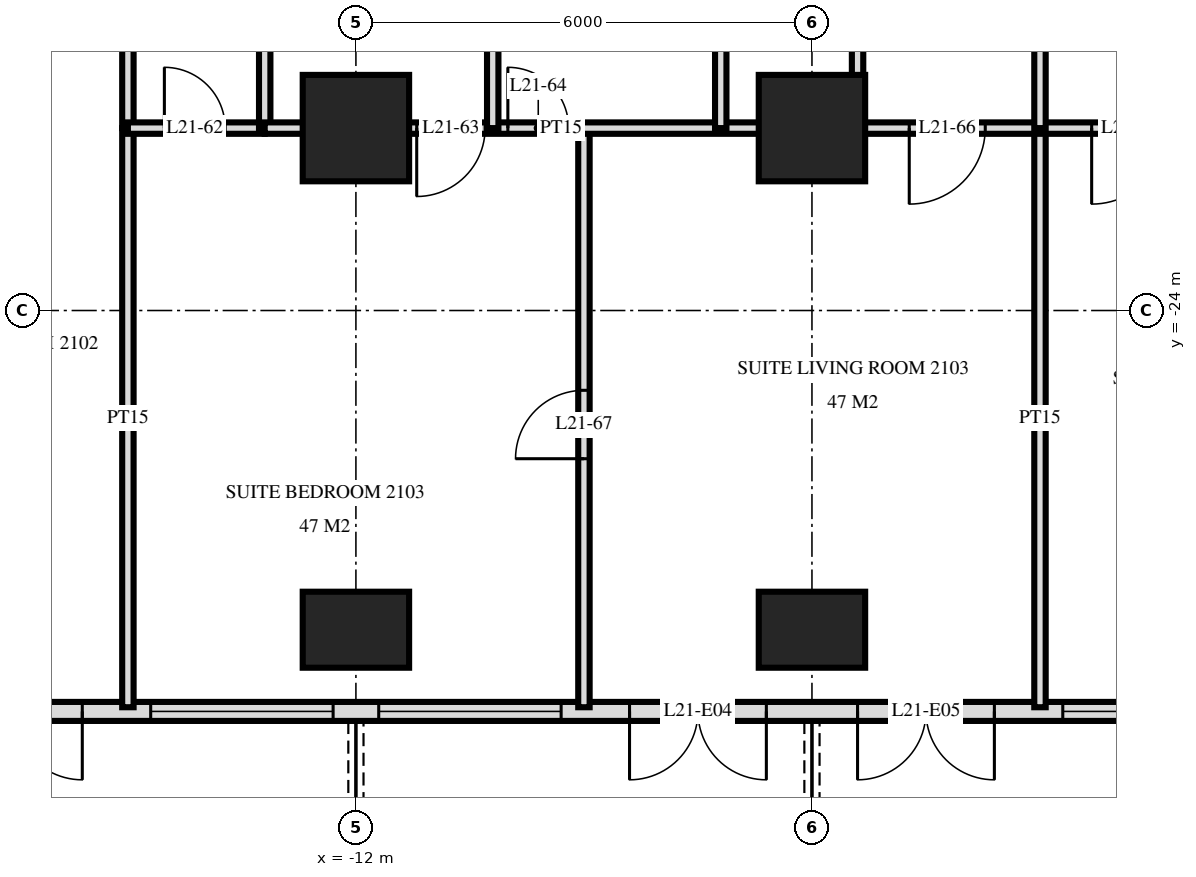
"""IFC4 building model, lengths in metres.
Left out: names, types, materials, properties, quantities, classifications, styles, units other than length and angle.
Written with IfcOpenShell. Run it as: python <this file> out.ifc"""

import sys

from ifc_helpers import new_model, si_unit, direction, frame, frame_2d, origin, origin_2d, place, context, subcontext, project, spatial, rectangle, extrude, element, fill, save


model = new_model("IFC4")
c1 = context("Model", 3, precision=1e-05, world=origin(), true_north=direction((0.0, 1.0)))
c2 = subcontext(c1, "Body", "Model", "MODEL_VIEW")
j1 = project(units=[si_unit("LENGTHUNIT", "METRE"), si_unit("PLANEANGLEUNIT", "RADIAN")], contexts=[c1])
p1 = place(None, origin())
s1 = spatial("IfcSite", under=j1, at=p1, CompositionType="ELEMENT")
p2 = place(p1, origin())
s2 = spatial("IfcBuilding", under=s1, at=p2, CompositionType="ELEMENT")
p3 = place(p2, frame((0.0, 0.0, 85.2)))
s3 = spatial("IfcBuildingStorey", under=s2, at=p3, CompositionType="ELEMENT", Elevation=85.2)
p4 = place(p3, frame((-12.0, -28.2, 0.0), z_axis=(0.0, 0.0, 1.0), x_axis=(1.0, 0.0, 0.0)))
e1 = element("IfcColumn", 1, at=p4, inside=s3, PredefinedType="COLUMN", context=c2, shape_type="SweptSolid", body=[
    extrude(rectangle(XDim=1.4, YDim=1.0, at=origin_2d()), origin(), (0.0, 0.0, 1.0), 3.6),
])
p5 = place(p3, frame((-12.0, -21.6, 0.0), z_axis=(0.0, 0.0, 1.0), x_axis=(1.0, 0.0, 0.0)))
e2 = element("IfcColumn", 2, at=p5, inside=s3, PredefinedType="COLUMN", context=c2, shape_type="SweptSolid", body=[
    extrude(rectangle(XDim=1.4, YDim=1.4, at=origin_2d()), origin(), (0.0, 0.0, 1.0), 3.6),
])
p6 = place(p3, frame((-6.0, -28.2, 0.0), z_axis=(0.0, 0.0, 1.0), x_axis=(1.0, 0.0, 0.0)))
e3 = element("IfcColumn", 3, at=p6, inside=s3, PredefinedType="COLUMN", context=c2, shape_type="SweptSolid", body=[
    extrude(rectangle(XDim=1.4, YDim=1.0, at=origin_2d()), origin(), (0.0, 0.0, 1.0), 3.6),
])
p7 = place(p3, frame((-6.0, -21.6, 0.0), z_axis=(0.0, 0.0, 1.0), x_axis=(1.0, 0.0, 0.0)))
e4 = element("IfcColumn", 4, at=p7, inside=s3, PredefinedType="COLUMN", context=c2, shape_type="SweptSolid", body=[
    extrude(rectangle(XDim=1.4, YDim=1.4, at=origin_2d()), origin(), (0.0, 0.0, 1.0), 3.6),
])
p8 = place(p3, frame((-28.775, -29.275, 0.0), z_axis=(0.0, 0.0, 1.0), x_axis=(1.0, 0.0, 0.0)))
e5 = element("IfcWall", 5, at=p8, inside=s3, PredefinedType="SOLIDWALL", context=c2, shape_type="SweptSolid", body=[
    extrude(rectangle(XDim=57.551, YDim=0.25, at=frame_2d((28.775, 0.0))), origin(), (0.0, 0.0, 1.0), 3.32),
])
p9 = place(p8, frame((0.575, 0.0, 0.0)))
e6 = element("IfcOpeningElement", 6, at=p9, cuts=e5, PredefinedType="OPENING", context=c2, shape_type="SweptSolid", body=[
    extrude(rectangle(XDim=1.8, YDim=2.4, at=frame_2d((0.9, 1.2))), frame((0.0, 0.135, 0.0), z_axis=(0.0, -1.0, 0.0), x_axis=(1.0, 0.0, 0.0)), (0.0, 0.0, 1.0), 0.27),
])
p10 = place(p8, frame((5.375, 0.0, 0.0)))
e7 = element("IfcOpeningElement", 7, at=p10, cuts=e5, PredefinedType="OPENING", context=c2, shape_type="SweptSolid", body=[
    extrude(rectangle(XDim=1.8, YDim=2.4, at=frame_2d((0.9, 1.2))), frame((0.0, 0.135, 0.0), z_axis=(0.0, -1.0, 0.0), x_axis=(1.0, 0.0, 0.0)), (0.0, 0.0, 1.0), 0.27),
])
p11 = place(p8, frame((8.075, 0.0, 0.3)))
e8 = element("IfcOpeningElement", 8, at=p11, cuts=e5, PredefinedType="OPENING", context=c2, shape_type="SweptSolid", body=[
    extrude(rectangle(XDim=2.4, YDim=2.1, at=frame_2d((1.2, 1.05))), frame((0.0, 0.135, 0.0), z_axis=(0.0, -1.0, 0.0), x_axis=(1.0, 0.0, 0.0)), (0.0, 0.0, 1.0), 0.27),
])
p12 = place(p8, frame((11.375, 0.0, 0.0)))
e9 = element("IfcOpeningElement", 9, at=p12, cuts=e5, PredefinedType="OPENING", context=c2, shape_type="SweptSolid", body=[
    extrude(rectangle(XDim=1.8, YDim=2.4, at=frame_2d((0.9, 1.2))), frame((0.0, 0.135, 0.0), z_axis=(0.0, -1.0, 0.0), x_axis=(1.0, 0.0, 0.0)), (0.0, 0.0, 1.0), 0.27),
])
p13 = place(p8, frame((14.075, 0.0, 0.3)))
e10 = element("IfcOpeningElement", 10, at=p13, cuts=e5, PredefinedType="OPENING", context=c2, shape_type="SweptSolid", body=[
    extrude(rectangle(XDim=2.4, YDim=2.1, at=frame_2d((1.2, 1.05))), frame((0.0, 0.135, 0.0), z_axis=(0.0, -1.0, 0.0), x_axis=(1.0, 0.0, 0.0)), (0.0, 0.0, 1.0), 0.27),
])
p14 = place(p8, frame((17.075, 0.0, 0.3)))
e11 = element("IfcOpeningElement", 11, at=p14, cuts=e5, PredefinedType="OPENING", context=c2, shape_type="SweptSolid", body=[
    extrude(rectangle(XDim=2.4, YDim=2.1, at=frame_2d((1.2, 1.05))), frame((0.0, 0.135, 0.0), z_axis=(0.0, -1.0, 0.0), x_axis=(1.0, 0.0, 0.0)), (0.0, 0.0, 1.0), 0.27),
])
p15 = place(p8, frame((20.375, 0.0, 0.0)))
e12 = element("IfcOpeningElement", 12, at=p15, cuts=e5, PredefinedType="OPENING", context=c2, shape_type="SweptSolid", body=[
    extrude(rectangle(XDim=1.8, YDim=2.4, at=frame_2d((0.9, 1.2))), frame((0.0, 0.135, 0.0), z_axis=(0.0, -1.0, 0.0), x_axis=(1.0, 0.0, 0.0)), (0.0, 0.0, 1.0), 0.27),
])
p16 = place(p8, frame((23.375, 0.0, 0.0)))
e13 = element("IfcOpeningElement", 13, at=p16, cuts=e5, PredefinedType="OPENING", context=c2, shape_type="SweptSolid", body=[
    extrude(rectangle(XDim=1.8, YDim=2.4, at=frame_2d((0.9, 1.2))), frame((0.0, 0.135, 0.0), z_axis=(0.0, -1.0, 0.0), x_axis=(1.0, 0.0, 0.0)), (0.0, 0.0, 1.0), 0.27),
])
p17 = place(p8, frame((26.075, 0.0, 0.3)))
e14 = element("IfcOpeningElement", 14, at=p17, cuts=e5, PredefinedType="OPENING", context=c2, shape_type="SweptSolid", body=[
    extrude(rectangle(XDim=2.4, YDim=2.1, at=frame_2d((1.2, 1.05))), frame((0.0, 0.135, 0.0), z_axis=(0.0, -1.0, 0.0), x_axis=(1.0, 0.0, 0.0)), (0.0, 0.0, 1.0), 0.27),
])
p18 = place(p8, frame((29.375, 0.0, 0.0)))
e15 = element("IfcOpeningElement", 15, at=p18, cuts=e5, PredefinedType="OPENING", context=c2, shape_type="SweptSolid", body=[
    extrude(rectangle(XDim=1.8, YDim=2.4, at=frame_2d((0.9, 1.2))), frame((0.0, 0.135, 0.0), z_axis=(0.0, -1.0, 0.0), x_axis=(1.0, 0.0, 0.0)), (0.0, 0.0, 1.0), 0.27),
])
p19 = place(p8, frame((32.075, 0.0, 0.3)))
e16 = element("IfcOpeningElement", 16, at=p19, cuts=e5, PredefinedType="OPENING", context=c2, shape_type="SweptSolid", body=[
    extrude(rectangle(XDim=2.4, YDim=2.1, at=frame_2d((1.2, 1.05))), frame((0.0, 0.135, 0.0), z_axis=(0.0, -1.0, 0.0), x_axis=(1.0, 0.0, 0.0)), (0.0, 0.0, 1.0), 0.27),
])
p20 = place(p8, frame((35.375, 0.0, 0.0)))
e17 = element("IfcOpeningElement", 17, at=p20, cuts=e5, PredefinedType="OPENING", context=c2, shape_type="SweptSolid", body=[
    extrude(rectangle(XDim=1.8, YDim=2.4, at=frame_2d((0.9, 1.2))), frame((0.0, 0.135, 0.0), z_axis=(0.0, -1.0, 0.0), x_axis=(1.0, 0.0, 0.0)), (0.0, 0.0, 1.0), 0.27),
])
p21 = place(p8, frame((38.075, 0.0, 0.3)))
e18 = element("IfcOpeningElement", 18, at=p21, cuts=e5, PredefinedType="OPENING", context=c2, shape_type="SweptSolid", body=[
    extrude(rectangle(XDim=2.4, YDim=2.1, at=frame_2d((1.2, 1.05))), frame((0.0, 0.135, 0.0), z_axis=(0.0, -1.0, 0.0), x_axis=(1.0, 0.0, 0.0)), (0.0, 0.0, 1.0), 0.27),
])
p22 = place(p8, frame((41.375, 0.0, 0.0)))
e19 = element("IfcOpeningElement", 19, at=p22, cuts=e5, PredefinedType="OPENING", context=c2, shape_type="SweptSolid", body=[
    extrude(rectangle(XDim=1.8, YDim=2.4, at=frame_2d((0.9, 1.2))), frame((0.0, 0.135, 0.0), z_axis=(0.0, -1.0, 0.0), x_axis=(1.0, 0.0, 0.0)), (0.0, 0.0, 1.0), 0.27),
])
p23 = place(p8, frame((44.075, 0.0, 0.3)))
e20 = element("IfcOpeningElement", 20, at=p23, cuts=e5, PredefinedType="OPENING", context=c2, shape_type="SweptSolid", body=[
    extrude(rectangle(XDim=2.4, YDim=2.1, at=frame_2d((1.2, 1.05))), frame((0.0, 0.135, 0.0), z_axis=(0.0, -1.0, 0.0), x_axis=(1.0, 0.0, 0.0)), (0.0, 0.0, 1.0), 0.27),
])
p24 = place(p8, frame((47.075, 0.0, 0.3)))
e21 = element("IfcOpeningElement", 21, at=p24, cuts=e5, PredefinedType="OPENING", context=c2, shape_type="SweptSolid", body=[
    extrude(rectangle(XDim=2.4, YDim=2.1, at=frame_2d((1.2, 1.05))), frame((0.0, 0.135, 0.0), z_axis=(0.0, -1.0, 0.0), x_axis=(1.0, 0.0, 0.0)), (0.0, 0.0, 1.0), 0.27),
])
p25 = place(p8, frame((50.375, 0.0, 0.0)))
e22 = element("IfcOpeningElement", 22, at=p25, cuts=e5, PredefinedType="OPENING", context=c2, shape_type="SweptSolid", body=[
    extrude(rectangle(XDim=1.8, YDim=2.4, at=frame_2d((0.9, 1.2))), frame((0.0, 0.135, 0.0), z_axis=(0.0, -1.0, 0.0), x_axis=(1.0, 0.0, 0.0)), (0.0, 0.0, 1.0), 0.27),
])
p26 = place(p8, frame((53.375, 0.0, 0.0)))
e23 = element("IfcOpeningElement", 23, at=p26, cuts=e5, PredefinedType="OPENING", context=c2, shape_type="SweptSolid", body=[
    extrude(rectangle(XDim=1.8, YDim=2.4, at=frame_2d((0.9, 1.2))), frame((0.0, 0.135, 0.0), z_axis=(0.0, -1.0, 0.0), x_axis=(1.0, 0.0, 0.0)), (0.0, 0.0, 1.0), 0.27),
])
p27 = place(p3, frame((-3.0, -21.6, 0.0), z_axis=(0.0, 0.0, 1.0), x_axis=(0.0, 1.0, 0.0)))
e24 = element("IfcWall", 24, at=p27, inside=s3, PredefinedType="PARTITIONING", context=c2, shape_type="SweptSolid", body=[
    extrude(rectangle(XDim=4.2, YDim=0.15, at=frame_2d((2.1, 0.0))), origin(), (0.0, 0.0, 1.0), 3.32),
])
p28 = place(p3, frame((-3.0, -29.22, 0.0), z_axis=(0.0, 0.0, 1.0), x_axis=(0.0, 1.0, 0.0)))
e25 = element("IfcWall", 25, at=p28, inside=s3, PredefinedType="PARTITIONING", context=c2, shape_type="SweptSolid", body=[
    extrude(rectangle(XDim=7.62, YDim=0.15, at=frame_2d((3.81, 0.0))), origin(), (0.0, 0.0, 1.0), 3.32),
])
p29 = place(p3, frame((-5.4, -21.6, 0.0), z_axis=(0.0, 0.0, 1.0), x_axis=(0.0, 1.0, 0.0)))
e26 = element("IfcWall", 26, at=p29, inside=s3, PredefinedType="PARTITIONING", context=c2, shape_type="SweptSolid", body=[
    extrude(rectangle(XDim=4.2, YDim=0.15, at=frame_2d((2.1, 0.0))), origin(), (0.0, 0.0, 1.0), 3.32),
])
p30 = place(p29, frame((1.58, 0.0, 0.0)))
e27 = element("IfcOpeningElement", 27, at=p30, cuts=e26, PredefinedType="OPENING", context=c2, shape_type="SweptSolid", body=[
    extrude(rectangle(XDim=1.0, YDim=2.1, at=frame_2d((0.5, 1.05))), frame((0.0, 0.085, 0.0), z_axis=(0.0, -1.0, 0.0), x_axis=(1.0, 0.0, 0.0)), (0.0, 0.0, 1.0), 0.17),
])
p31 = place(p3, frame((-7.2, -21.6, 0.0), z_axis=(0.0, 0.0, 1.0), x_axis=(0.0, 1.0, 0.0)))
e28 = element("IfcWall", 28, at=p31, inside=s3, PredefinedType="PARTITIONING", context=c2, shape_type="SweptSolid", body=[
    extrude(rectangle(XDim=4.2, YDim=0.15, at=frame_2d((2.1, 0.0))), origin(), (0.0, 0.0, 1.0), 3.32),
])
p32 = place(p3, frame((-9.0, -29.22, 0.0), z_axis=(0.0, 0.0, 1.0), x_axis=(0.0, 1.0, 0.0)))
e29 = element("IfcWall", 29, at=p32, inside=s3, PredefinedType="PARTITIONING", context=c2, shape_type="SweptSolid", body=[
    extrude(rectangle(XDim=7.62, YDim=0.15, at=frame_2d((3.81, 0.0))), origin(), (0.0, 0.0, 1.0), 3.32),
])
p33 = place(p32, frame((3.27, 0.0, 0.0)))
e30 = element("IfcOpeningElement", 30, at=p33, cuts=e29, PredefinedType="OPENING", context=c2, shape_type="SweptSolid", body=[
    extrude(rectangle(XDim=0.9, YDim=2.1, at=frame_2d((0.45, 1.05))), frame((0.0, 0.085, 0.0), z_axis=(0.0, -1.0, 0.0), x_axis=(1.0, 0.0, 0.0)), (0.0, 0.0, 1.0), 0.17),
])
p34 = place(p3, frame((-10.2, -21.6, 0.0), z_axis=(0.0, 0.0, 1.0), x_axis=(0.0, 1.0, 0.0)))
e31 = element("IfcWall", 31, at=p34, inside=s3, PredefinedType="PARTITIONING", context=c2, shape_type="SweptSolid", body=[
    extrude(rectangle(XDim=4.2, YDim=0.15, at=frame_2d((2.1, 0.0))), origin(), (0.0, 0.0, 1.0), 3.32),
])
p35 = place(p3, frame((-13.2, -21.6, 0.0), z_axis=(0.0, 0.0, 1.0), x_axis=(0.0, 1.0, 0.0)))
e32 = element("IfcWall", 32, at=p35, inside=s3, PredefinedType="PLUMBINGWALL", context=c2, shape_type="SweptSolid", body=[
    extrude(rectangle(XDim=4.2, YDim=0.15, at=frame_2d((2.1, 0.0))), origin(), (0.0, 0.0, 1.0), 3.32),
])
p36 = place(p3, frame((-15.0, -29.22, 0.0), z_axis=(0.0, 0.0, 1.0), x_axis=(0.0, 1.0, 0.0)))
e33 = element("IfcWall", 33, at=p36, inside=s3, PredefinedType="PARTITIONING", context=c2, shape_type="SweptSolid", body=[
    extrude(rectangle(XDim=7.62, YDim=0.15, at=frame_2d((3.81, 0.0))), origin(), (0.0, 0.0, 1.0), 3.32),
])
p37 = place(p3, frame((-15.0, -21.6, 0.0), z_axis=(0.0, 0.0, 1.0), x_axis=(0.0, 1.0, 0.0)))
e34 = element("IfcWall", 34, at=p37, inside=s3, PredefinedType="PLUMBINGWALL", context=c2, shape_type="SweptSolid", body=[
    extrude(rectangle(XDim=4.2, YDim=0.15, at=frame_2d((2.1, 0.0))), origin(), (0.0, 0.0, 1.0), 3.32),
])
p38 = place(p3, frame((-5.4, -21.6, 0.0), z_axis=(0.0, 0.0, 1.0), x_axis=(1.0, 0.0, 0.0)))
e35 = element("IfcWall", 35, at=p38, inside=s3, PredefinedType="PARTITIONING", context=c2, shape_type="SweptSolid", body=[
    extrude(rectangle(XDim=4.8, YDim=0.15, at=frame_2d((2.4, 0.0))), origin(), (0.0, 0.0, 1.0), 3.32),
])
p39 = place(p38, frame((0.68, 0.0, 0.0)))
e36 = element("IfcOpeningElement", 36, at=p39, cuts=e35, PredefinedType="OPENING", context=c2, shape_type="SweptSolid", body=[
    extrude(rectangle(XDim=1.0, YDim=2.1, at=frame_2d((0.5, 1.05))), frame((0.0, 0.085, 0.0), z_axis=(0.0, -1.0, 0.0), x_axis=(1.0, 0.0, 0.0)), (0.0, 0.0, 1.0), 0.17),
])
p40 = place(p38, frame((3.08, 0.0, 0.0)))
e37 = element("IfcOpeningElement", 37, at=p40, cuts=e35, PredefinedType="OPENING", context=c2, shape_type="SweptSolid", body=[
    extrude(rectangle(XDim=1.0, YDim=2.1, at=frame_2d((0.5, 1.05))), frame((0.0, 0.085, 0.0), z_axis=(0.0, -1.0, 0.0), x_axis=(1.0, 0.0, 0.0)), (0.0, 0.0, 1.0), 0.17),
])
p41 = place(p3, frame((-13.2, -21.6, 0.0), z_axis=(0.0, 0.0, 1.0), x_axis=(1.0, 0.0, 0.0)))
e38 = element("IfcWall", 38, at=p41, inside=s3, PredefinedType="PARTITIONING", context=c2, shape_type="SweptSolid", body=[
    extrude(rectangle(XDim=7.8, YDim=0.15, at=frame_2d((3.9, 0.0))), origin(), (0.0, 0.0, 1.0), 3.32),
])
p42 = place(p41, frame((2.0, 0.0, 0.0)))
e39 = element("IfcOpeningElement", 39, at=p42, cuts=e38, PredefinedType="OPENING", context=c2, shape_type="SweptSolid", body=[
    extrude(rectangle(XDim=0.9, YDim=2.1, at=frame_2d((0.45, 1.05))), frame((0.0, 0.085, 0.0), z_axis=(0.0, -1.0, 0.0), x_axis=(1.0, 0.0, 0.0)), (0.0, 0.0, 1.0), 0.17),
])
p43 = place(p41, frame((3.199, 0.0, 0.0)))
e40 = element("IfcOpeningElement", 40, at=p43, cuts=e38, PredefinedType="OPENING", context=c2, shape_type="SweptSolid", body=[
    extrude(rectangle(XDim=0.8, YDim=2.1, at=frame_2d((0.4, 1.05))), frame((0.0, 0.085, 0.0), z_axis=(0.0, -1.0, 0.0), x_axis=(1.0, 0.0, 0.0)), (0.0, 0.0, 1.0), 0.17),
])
p44 = place(p3, frame((-15.0, -21.6, 0.0), z_axis=(0.0, 0.0, 1.0), x_axis=(1.0, 0.0, 0.0)))
e41 = element("IfcWall", 41, at=p44, inside=s3, PredefinedType="PLUMBINGWALL", context=c2, shape_type="SweptSolid", body=[
    extrude(rectangle(XDim=1.8, YDim=0.15, at=frame_2d((0.9, 0.0))), origin(), (0.0, 0.0, 1.0), 3.32),
])
p45 = place(p44, frame((0.48, 0.0, 0.0)))
e42 = element("IfcOpeningElement", 42, at=p45, cuts=e41, PredefinedType="OPENING", context=c2, shape_type="SweptSolid", body=[
    extrude(rectangle(XDim=0.8, YDim=2.1, at=frame_2d((0.4, 1.05))), frame((0.0, 0.085, 0.0), z_axis=(0.0, -1.0, 0.0), x_axis=(1.0, 0.0, 0.0)), (0.0, 0.0, 1.0), 0.17),
])
p46 = place(p12, frame((0.9, 0.0, 0.0), z_axis=(0.0, 0.0, 1.0), x_axis=(-1.0, 0.0, 0.0)))
e43 = element("IfcDoor", 43, at=p46, inside=s3, OperationType="DOUBLE_DOOR_SINGLE_SWING", PredefinedType="DOOR", context=c2, shape_type="SweptSolid", body=[
    extrude(rectangle(XDim=1.8, YDim=2.4, at=frame_2d((0.0, 1.2))), frame((0.0, -0.025, 0.0), z_axis=(0.0, 1.0, 0.0), x_axis=(-1.0, 0.0, 0.0)), (0.0, 0.0, 1.0), 0.05),
])
fill(e9, e43)
p47 = place(p13, origin())
e44 = element("IfcWindow", 44, at=p47, inside=s3, PartitioningType="SINGLE_PANEL", PredefinedType="WINDOW", context=c2, shape_type="SweptSolid", body=[
    extrude(rectangle(XDim=2.4, YDim=2.1, at=frame_2d((1.2, 1.05))), frame((0.0, 0.03, 0.0), z_axis=(0.0, -1.0, 0.0), x_axis=(1.0, 0.0, 0.0)), (0.0, 0.0, 1.0), 0.06),
])
fill(e10, e44)
p48 = place(p14, origin())
e45 = element("IfcWindow", 45, at=p48, inside=s3, PartitioningType="SINGLE_PANEL", PredefinedType="WINDOW", context=c2, shape_type="SweptSolid", body=[
    extrude(rectangle(XDim=2.4, YDim=2.1, at=frame_2d((1.2, 1.05))), frame((0.0, 0.03, 0.0), z_axis=(0.0, -1.0, 0.0), x_axis=(1.0, 0.0, 0.0)), (0.0, 0.0, 1.0), 0.06),
])
fill(e11, e45)
p49 = place(p15, frame((0.9, 0.0, 0.0), z_axis=(0.0, 0.0, 1.0), x_axis=(-1.0, 0.0, 0.0)))
e46 = element("IfcDoor", 46, at=p49, inside=s3, OperationType="DOUBLE_DOOR_SINGLE_SWING", PredefinedType="DOOR", context=c2, shape_type="SweptSolid", body=[
    extrude(rectangle(XDim=1.8, YDim=2.4, at=frame_2d((0.0, 1.2))), frame((0.0, -0.025, 0.0), z_axis=(0.0, 1.0, 0.0), x_axis=(-1.0, 0.0, 0.0)), (0.0, 0.0, 1.0), 0.05),
])
fill(e12, e46)
p50 = place(p16, frame((0.9, 0.0, 0.0), z_axis=(0.0, 0.0, 1.0), x_axis=(-1.0, 0.0, 0.0)))
e47 = element("IfcDoor", 47, at=p50, inside=s3, OperationType="DOUBLE_DOOR_SINGLE_SWING", PredefinedType="DOOR", context=c2, shape_type="SweptSolid", body=[
    extrude(rectangle(XDim=1.8, YDim=2.4, at=frame_2d((0.0, 1.2))), frame((0.0, -0.025, 0.0), z_axis=(0.0, 1.0, 0.0), x_axis=(-1.0, 0.0, 0.0)), (0.0, 0.0, 1.0), 0.05),
])
fill(e13, e47)
p51 = place(p17, origin())
e48 = element("IfcWindow", 48, at=p51, inside=s3, PartitioningType="SINGLE_PANEL", PredefinedType="WINDOW", context=c2, shape_type="SweptSolid", body=[
    extrude(rectangle(XDim=2.4, YDim=2.1, at=frame_2d((1.2, 1.05))), frame((0.0, 0.03, 0.0), z_axis=(0.0, -1.0, 0.0), x_axis=(1.0, 0.0, 0.0)), (0.0, 0.0, 1.0), 0.06),
])
fill(e14, e48)
p52 = place(p45, origin())
e49 = element("IfcDoor", 49, at=p52, inside=s3, OperationType="SINGLE_SWING_RIGHT", PredefinedType="DOOR", context=c2, shape_type="SweptSolid", body=[
    extrude(rectangle(XDim=0.8, YDim=2.1, at=frame_2d((0.4, 1.05))), frame((0.0, 0.025, 0.0), z_axis=(0.0, -1.0, 0.0), x_axis=(1.0, 0.0, 0.0)), (0.0, 0.0, 1.0), 0.05),
])
fill(e42, e49)
p53 = place(p42, frame((0.45, 0.0, 0.0), z_axis=(0.0, 0.0, 1.0), x_axis=(-1.0, 0.0, 0.0)))
e50 = element("IfcDoor", 50, at=p53, inside=s3, OperationType="SINGLE_SWING_LEFT", PredefinedType="DOOR", context=c2, shape_type="SweptSolid", body=[
    extrude(rectangle(XDim=0.9, YDim=2.1, at=frame_2d((0.0, 1.05))), frame((0.0, -0.025, 0.0), z_axis=(0.0, 1.0, 0.0), x_axis=(-1.0, 0.0, 0.0)), (0.0, 0.0, 1.0), 0.05),
])
fill(e39, e50)
p54 = place(p43, origin())
e51 = element("IfcDoor", 51, at=p54, inside=s3, OperationType="SINGLE_SWING_RIGHT", PredefinedType="DOOR", context=c2, shape_type="SweptSolid", body=[
    extrude(rectangle(XDim=0.8, YDim=2.1, at=frame_2d((0.4, 1.05))), frame((0.0, 0.025, 0.0), z_axis=(0.0, -1.0, 0.0), x_axis=(1.0, 0.0, 0.0)), (0.0, 0.0, 1.0), 0.05),
])
fill(e40, e51)
p55 = place(p39, frame((0.5, 0.0, 0.0), z_axis=(0.0, 0.0, 1.0), x_axis=(-1.0, 0.0, 0.0)))
e52 = element("IfcDoor", 52, at=p55, inside=s3, OperationType="SINGLE_SWING_LEFT", PredefinedType="DOOR", context=c2, shape_type="SweptSolid", body=[
    extrude(rectangle(XDim=1.0, YDim=2.1, at=frame_2d((0.0, 1.05))), frame((0.0, -0.025, 0.0), z_axis=(0.0, 1.0, 0.0), x_axis=(-1.0, 0.0, 0.0)), (0.0, 0.0, 1.0), 0.05),
])
fill(e36, e52)
p56 = place(p33, origin())
e53 = element("IfcDoor", 53, at=p56, inside=s3, OperationType="SINGLE_SWING_RIGHT", PredefinedType="DOOR", context=c2, shape_type="SweptSolid", body=[
    extrude(rectangle(XDim=0.9, YDim=2.1, at=frame_2d((0.45, 1.05))), frame((0.0, 0.025, 0.0), z_axis=(0.0, -1.0, 0.0), x_axis=(1.0, 0.0, 0.0)), (0.0, 0.0, 1.0), 0.05),
])
fill(e30, e53)
p57 = place(p40, frame((0.5, 0.0, 0.0), z_axis=(0.0, 0.0, 1.0), x_axis=(-1.0, 0.0, 0.0)))
e54 = element("IfcDoor", 54, at=p57, inside=s3, OperationType="SINGLE_SWING_LEFT", PredefinedType="DOOR", context=c2, shape_type="SweptSolid", body=[
    extrude(rectangle(XDim=1.0, YDim=2.1, at=frame_2d((0.0, 1.05))), frame((0.0, -0.025, 0.0), z_axis=(0.0, 1.0, 0.0), x_axis=(-1.0, 0.0, 0.0)), (0.0, 0.0, 1.0), 0.05),
])
fill(e37, e54)
save(model, sys.argv[1])
